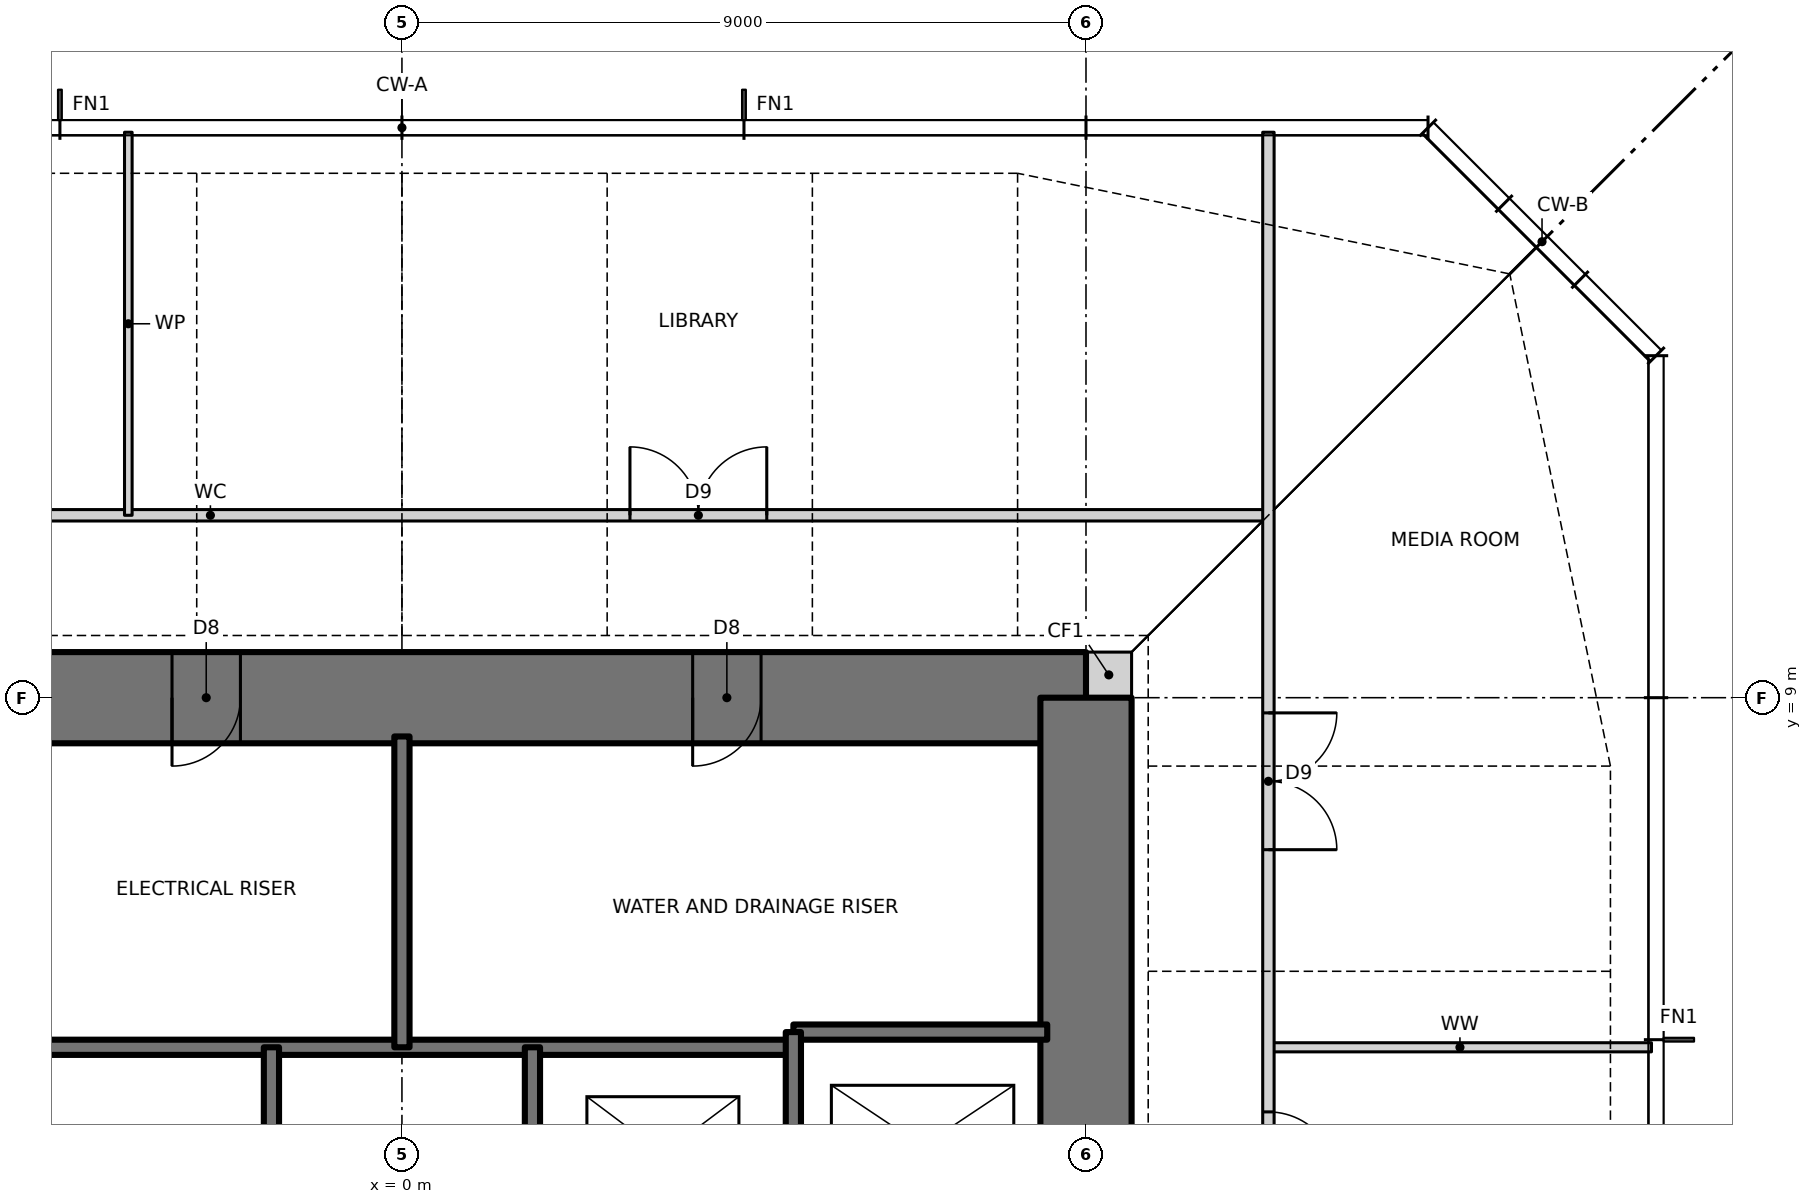
"""IFC4 building model, lengths in metres.
Left out: names, types, materials, properties, quantities, classifications, styles, units other than length and angle.
Written with IfcOpenShell. Run it as: python <this file> out.ifc"""

import sys

from ifc_helpers import new_model, si_unit, direction, frame, frame_2d, origin, place, context, subcontext, project, spatial, rectangle, extrude, element, fill, save


model = new_model("IFC4")
c1 = context("Model", 3, precision=1e-05, world=origin(), true_north=direction((0.0, 1.0)))
c2 = subcontext(c1, "Body", "Model", "MODEL_VIEW")
j1 = project(units=[si_unit("LENGTHUNIT", "METRE"), si_unit("PLANEANGLEUNIT", "RADIAN")], contexts=[c1])
p1 = place(None, origin())
s1 = spatial("IfcSite", under=j1, at=p1, CompositionType="ELEMENT")
p2 = place(p1, origin())
s2 = spatial("IfcBuilding", under=s1, at=p2, CompositionType="ELEMENT")
p3 = place(p2, frame((0.0, 0.0, 215.0)))
s3 = spatial("IfcBuildingStorey", under=s2, at=p3, CompositionType="ELEMENT", Elevation=215.0)
p4 = place(p3, frame((9.0, 9.3, 0.0), z_axis=(0.0, 0.0, 1.0), x_axis=(1.0, 0.0, 0.0)))
e1 = element("IfcWall", 1, at=p4, inside=s3, PredefinedType="SOLIDWALL", context=c2, shape_type="SweptSolid", body=[
    extrude(rectangle(XDim=0.6, YDim=0.6, at=frame_2d((0.3, 0.0))), origin(), (0.0, 0.0, 1.0), 3.5),
])
p5 = place(p3, frame((9.0, 9.0, 0.0), z_axis=(0.0, 0.0, 1.0), x_axis=(-1.0, 0.0, 0.0)))
e2 = element("IfcWall", 2, at=p5, inside=s3, PredefinedType="SHEAR", context=c2, shape_type="SweptSolid", body=[
    extrude(rectangle(XDim=18.0, YDim=1.2, at=frame_2d((9.0, 0.0))), origin(), (0.0, 0.0, 1.0), 3.5),
])
p6 = place(p5, frame((11.125, 0.0, 0.0)))
e3 = element("IfcOpeningElement", 3, at=p6, cuts=e2, PredefinedType="OPENING", context=c2, shape_type="SweptSolid", body=[
    extrude(rectangle(XDim=0.9, YDim=2.1, at=frame_2d((0.45, 1.05))), frame((0.0, 0.61, 0.0), z_axis=(0.0, -1.0, 0.0), x_axis=(1.0, 0.0, 0.0)), (0.0, 0.0, 1.0), 1.22),
])
p7 = place(p5, frame((4.275, 0.0, 0.0)))
e4 = element("IfcOpeningElement", 4, at=p7, cuts=e2, PredefinedType="OPENING", context=c2, shape_type="SweptSolid", body=[
    extrude(rectangle(XDim=0.9, YDim=2.1, at=frame_2d((0.45, 1.05))), frame((0.0, 0.61, 0.0), z_axis=(0.0, -1.0, 0.0), x_axis=(1.0, 0.0, 0.0)), (0.0, 0.0, 1.0), 1.22),
])
p8 = place(p3, frame((9.0, -9.0, 0.0), z_axis=(0.0, 0.0, 1.0), x_axis=(0.0, 1.0, 0.0)))
e5 = element("IfcWall", 5, at=p8, inside=s3, PredefinedType="SHEAR", context=c2, shape_type="SweptSolid", body=[
    extrude(rectangle(XDim=18.0, YDim=1.2, at=frame_2d((9.0, 0.0))), origin(), (0.0, 0.0, 1.0), 3.5),
])
p9 = place(p8, frame((8.5, 0.0, 0.0)))
e6 = element("IfcOpeningElement", 6, at=p9, cuts=e5, PredefinedType="OPENING", context=c2, shape_type="SweptSolid", body=[
    extrude(rectangle(XDim=1.0, YDim=2.1, at=frame_2d((0.5, 1.05))), frame((0.0, 0.61, 0.0), z_axis=(0.0, -1.0, 0.0), x_axis=(1.0, 0.0, 0.0)), (0.0, 0.0, 1.0), 1.22),
])
p10 = place(p3, frame((-5.15, 4.4, 0.0), z_axis=(0.0, 0.0, 1.0), x_axis=(1.0, 0.0, 0.0)))
e7 = element("IfcWall", 7, at=p10, inside=s3, PredefinedType="SOLIDWALL", context=c2, shape_type="SweptSolid", body=[
    extrude(rectangle(XDim=10.3, YDim=0.2, at=frame_2d((5.15, 0.0))), origin(), (0.0, 0.0, 1.0), 3.5),
])
p11 = place(p3, frame((11.4, 4.4, 0.0), z_axis=(0.0, 0.0, 1.0), x_axis=(1.0, 0.0, 0.0)))
e8 = element("IfcWall", 8, at=p11, inside=s3, PredefinedType="PARTITIONING", context=c2, shape_type="SweptSolid", body=[
    extrude(rectangle(XDim=5.04, YDim=0.12, at=frame_2d((2.52, 0.0))), origin(), (0.0, 0.0, 1.0), 3.27),
])
p12 = place(p3, frame((5.15, 4.6, 0.0), z_axis=(0.0, 0.0, 1.0), x_axis=(1.0, 0.0, 0.0)))
e9 = element("IfcWall", 9, at=p12, inside=s3, PredefinedType="SOLIDWALL", context=c2, shape_type="SweptSolid", body=[
    extrude(rectangle(XDim=3.34, YDim=0.2, at=frame_2d((1.67, 0.0))), origin(), (0.0, 0.0, 1.0), 3.5),
])
p13 = place(p3, frame((-16.44, 11.4, 0.0), z_axis=(0.0, 0.0, 1.0), x_axis=(1.0, 0.0, 0.0)))
e10 = element("IfcWall", 10, at=p13, inside=s3, PredefinedType="PARTITIONING", context=c2, shape_type="SweptSolid", body=[
    extrude(rectangle(XDim=27.84, YDim=0.15, at=frame_2d((13.92, 0.0))), origin(), (0.0, 0.0, 1.0), 3.27),
])
p14 = place(p13, frame((19.44, 0.0, 0.0)))
e11 = element("IfcOpeningElement", 11, at=p14, cuts=e10, PredefinedType="OPENING", context=c2, shape_type="SweptSolid", body=[
    extrude(rectangle(XDim=1.8, YDim=2.1, at=frame_2d((0.9, 1.05))), frame((0.0, 0.085, 0.0), z_axis=(0.0, -1.0, 0.0), x_axis=(1.0, 0.0, 0.0)), (0.0, 0.0, 1.0), 0.17),
])
p15 = place(p13, frame((8.04, 0.0, 0.0)))
e12 = element("IfcOpeningElement", 12, at=p15, cuts=e10, PredefinedType="OPENING", context=c2, shape_type="SweptSolid", body=[
    extrude(rectangle(XDim=1.8, YDim=2.1, at=frame_2d((0.9, 1.05))), frame((0.0, 0.085, 0.0), z_axis=(0.0, -1.0, 0.0), x_axis=(1.0, 0.0, 0.0)), (0.0, 0.0, 1.0), 0.17),
])
p16 = place(p3, frame((11.4, -11.4, 0.0), z_axis=(0.0, 0.0, 1.0), x_axis=(0.0, 1.0, 0.0)))
e13 = element("IfcWall", 13, at=p16, inside=s3, PredefinedType="PARTITIONING", context=c2, shape_type="SweptSolid", body=[
    extrude(rectangle(XDim=27.84, YDim=0.15, at=frame_2d((13.92, 0.0))), origin(), (0.0, 0.0, 1.0), 3.27),
])
p17 = place(p16, frame((1.55, 0.0, 0.0)))
e14 = element("IfcOpeningElement", 14, at=p17, cuts=e13, PredefinedType="OPENING", context=c2, shape_type="SweptSolid", body=[
    extrude(rectangle(XDim=0.9, YDim=2.1, at=frame_2d((0.45, 1.05))), frame((0.0, 0.085, 0.0), z_axis=(0.0, -1.0, 0.0), x_axis=(1.0, 0.0, 0.0)), (0.0, 0.0, 1.0), 0.17),
])
p18 = place(p16, frame((5.55, 0.0, 0.0)))
e15 = element("IfcOpeningElement", 15, at=p18, cuts=e13, PredefinedType="OPENING", context=c2, shape_type="SweptSolid", body=[
    extrude(rectangle(XDim=0.9, YDim=2.1, at=frame_2d((0.45, 1.05))), frame((0.0, 0.085, 0.0), z_axis=(0.0, -1.0, 0.0), x_axis=(1.0, 0.0, 0.0)), (0.0, 0.0, 1.0), 0.17),
])
p19 = place(p16, frame((8.75, 0.0, 0.0)))
e16 = element("IfcOpeningElement", 16, at=p19, cuts=e13, PredefinedType="OPENING", context=c2, shape_type="SweptSolid", body=[
    extrude(rectangle(XDim=0.9, YDim=2.1, at=frame_2d((0.45, 1.05))), frame((0.0, 0.085, 0.0), z_axis=(0.0, -1.0, 0.0), x_axis=(1.0, 0.0, 0.0)), (0.0, 0.0, 1.0), 0.17),
])
p20 = place(p16, frame((11.35, 0.0, 0.0)))
e17 = element("IfcOpeningElement", 17, at=p20, cuts=e13, PredefinedType="OPENING", context=c2, shape_type="SweptSolid", body=[
    extrude(rectangle(XDim=0.9, YDim=2.1, at=frame_2d((0.45, 1.05))), frame((0.0, 0.085, 0.0), z_axis=(0.0, -1.0, 0.0), x_axis=(1.0, 0.0, 0.0)), (0.0, 0.0, 1.0), 0.17),
])
p21 = place(p16, frame((14.05, 0.0, 0.0)))
e18 = element("IfcOpeningElement", 18, at=p21, cuts=e13, PredefinedType="OPENING", context=c2, shape_type="SweptSolid", body=[
    extrude(rectangle(XDim=0.9, YDim=2.1, at=frame_2d((0.45, 1.05))), frame((0.0, 0.085, 0.0), z_axis=(0.0, -1.0, 0.0), x_axis=(1.0, 0.0, 0.0)), (0.0, 0.0, 1.0), 0.17),
])
p22 = place(p16, frame((18.4, 0.0, 0.0)))
e19 = element("IfcOpeningElement", 19, at=p22, cuts=e13, PredefinedType="OPENING", context=c2, shape_type="SweptSolid", body=[
    extrude(rectangle(XDim=1.8, YDim=2.1, at=frame_2d((0.9, 1.05))), frame((0.0, 0.085, 0.0), z_axis=(0.0, -1.0, 0.0), x_axis=(1.0, 0.0, 0.0)), (0.0, 0.0, 1.0), 0.17),
])
p23 = place(p3, frame((5.15, -8.49, 0.0), z_axis=(0.0, 0.0, 1.0), x_axis=(0.0, 1.0, 0.0)))
e20 = element("IfcWall", 20, at=p23, inside=s3, PredefinedType="SOLIDWALL", context=c2, shape_type="SweptSolid", body=[
    extrude(rectangle(XDim=13.09, YDim=0.2, at=frame_2d((6.545, 0.0))), origin(), (0.0, 0.0, 1.0), 3.5),
])
p24 = place(p23, frame((7.89, 0.0, 0.0)))
e21 = element("IfcOpeningElement", 21, at=p24, cuts=e20, PredefinedType="OPENING", context=c2, shape_type="SweptSolid", body=[
    extrude(rectangle(XDim=1.2, YDim=2.1, at=frame_2d((0.6, 1.05))), frame((0.0, 0.11, 0.0), z_axis=(0.0, -1.0, 0.0), x_axis=(1.0, 0.0, 0.0)), (0.0, 0.0, 1.0), 0.22),
])
p25 = place(p3, frame((1.717, 1.6, 0.0), z_axis=(0.0, 0.0, 1.0), x_axis=(0.0, 1.0, 0.0)))
e22 = element("IfcWall", 22, at=p25, inside=s3, PredefinedType="SOLIDWALL", context=c2, shape_type="SweptSolid", body=[
    extrude(rectangle(XDim=2.8, YDim=0.2, at=frame_2d((1.4, 0.0))), origin(), (0.0, 0.0, 1.0), 3.5),
])
p26 = place(p3, frame((0.0, 4.4, 0.0), z_axis=(0.0, 0.0, 1.0), x_axis=(0.0, 1.0, 0.0)))
e23 = element("IfcWall", 23, at=p26, inside=s3, PredefinedType="SOLIDWALL", context=c2, shape_type="SweptSolid", body=[
    extrude(rectangle(XDim=4.09, YDim=0.2, at=frame_2d((2.045, 0.0))), origin(), (0.0, 0.0, 1.0), 3.5),
])
p27 = place(p3, frame((-1.717, 1.6, 0.0), z_axis=(0.0, 0.0, 1.0), x_axis=(0.0, 1.0, 0.0)))
e24 = element("IfcWall", 24, at=p27, inside=s3, PredefinedType="SOLIDWALL", context=c2, shape_type="SweptSolid", body=[
    extrude(rectangle(XDim=2.8, YDim=0.2, at=frame_2d((1.4, 0.0))), origin(), (0.0, 0.0, 1.0), 3.5),
])
p28 = place(p3, frame((-3.6, 11.4, 0.0), z_axis=(0.0, 0.0, 1.0), x_axis=(0.0, 1.0, 0.0)))
e25 = element("IfcWall", 25, at=p28, inside=s3, PredefinedType="PARTITIONING", context=c2, shape_type="SweptSolid", body=[
    extrude(rectangle(XDim=5.04, YDim=0.1, at=frame_2d((2.52, 0.0))), origin(), (0.0, 0.0, 1.0), 3.27),
])
p29 = place(p21, frame((0.9, 0.0, 0.0), z_axis=(0.0, 0.0, 1.0), x_axis=(-1.0, 0.0, 0.0)))
e26 = element("IfcDoor", 26, at=p29, inside=s3, OperationType="SINGLE_SWING_RIGHT", PredefinedType="DOOR", context=c2, shape_type="SweptSolid", body=[
    extrude(rectangle(XDim=0.9, YDim=2.1, at=frame_2d((0.45, 1.05))), frame((0.0, 0.025, 0.0), z_axis=(0.0, -1.0, 0.0), x_axis=(1.0, 0.0, 0.0)), (0.0, 0.0, 1.0), 0.05),
])
fill(e18, e26)
p30 = place(p22, frame((1.8, 0.0, 0.0), z_axis=(0.0, 0.0, 1.0), x_axis=(-1.0, 0.0, 0.0)))
e27 = element("IfcDoor", 27, at=p30, inside=s3, OperationType="DOUBLE_DOOR_SINGLE_SWING", PredefinedType="DOOR", context=c2, shape_type="SweptSolid", body=[
    extrude(rectangle(XDim=1.8, YDim=2.1, at=frame_2d((0.9, 1.05))), frame((0.0, 0.025, 0.0), z_axis=(0.0, -1.0, 0.0), x_axis=(1.0, 0.0, 0.0)), (0.0, 0.0, 1.0), 0.05),
])
fill(e19, e27)
p31 = place(p14, origin())
e28 = element("IfcDoor", 28, at=p31, inside=s3, OperationType="DOUBLE_DOOR_SINGLE_SWING", PredefinedType="DOOR", context=c2, shape_type="SweptSolid", body=[
    extrude(rectangle(XDim=1.8, YDim=2.1, at=frame_2d((0.9, 1.05))), frame((0.0, 0.025, 0.0), z_axis=(0.0, -1.0, 0.0), x_axis=(1.0, 0.0, 0.0)), (0.0, 0.0, 1.0), 0.05),
])
fill(e11, e28)
p32 = place(p6, origin())
e29 = element("IfcDoor", 29, at=p32, inside=s3, OperationType="SINGLE_SWING_RIGHT", PredefinedType="DOOR", context=c2, shape_type="SweptSolid", body=[
    extrude(rectangle(XDim=0.9, YDim=2.1, at=frame_2d((0.45, 1.05))), frame((0.0, 0.025, 0.0), z_axis=(0.0, -1.0, 0.0), x_axis=(1.0, 0.0, 0.0)), (0.0, 0.0, 1.0), 0.05),
])
fill(e3, e29)
p33 = place(p7, origin())
e30 = element("IfcDoor", 30, at=p33, inside=s3, OperationType="SINGLE_SWING_RIGHT", PredefinedType="DOOR", context=c2, shape_type="SweptSolid", body=[
    extrude(rectangle(XDim=0.9, YDim=2.1, at=frame_2d((0.45, 1.05))), frame((0.0, 0.025, 0.0), z_axis=(0.0, -1.0, 0.0), x_axis=(1.0, 0.0, 0.0)), (0.0, 0.0, 1.0), 0.05),
])
fill(e4, e30)
save(model, sys.argv[1])
